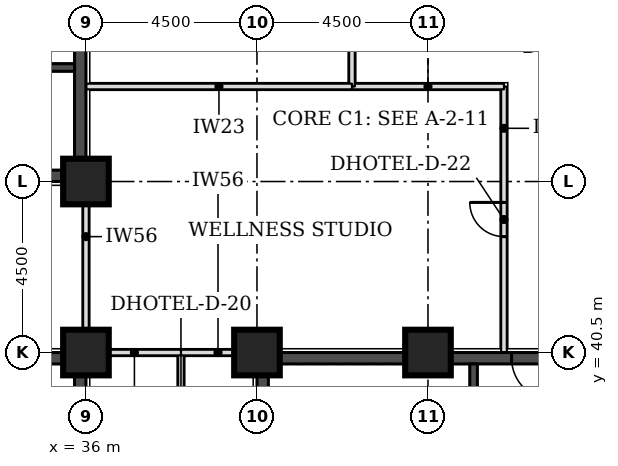
"""IFC4 building model, lengths in metres.
Left out: names, types, materials, properties, quantities, classifications, styles, units other than length and angle.
Written with IfcOpenShell. Run it as: python <this file> out.ifc"""

import sys

from ifc_helpers import new_model, si_unit, direction, frame, frame_2d, origin, origin_2d, place, context, subcontext, project, spatial, rectangle, extrude, element, fill, save


model = new_model("IFC4")
c1 = context("Model", 3, precision=1e-05, world=origin(), true_north=direction((0.0, 1.0)))
c2 = subcontext(c1, "Body", "Model", "MODEL_VIEW")
j1 = project(units=[si_unit("LENGTHUNIT", "METRE"), si_unit("PLANEANGLEUNIT", "RADIAN")], contexts=[c1])
p1 = place(None, origin())
s1 = spatial("IfcSite", under=j1, at=p1, CompositionType="ELEMENT")
p2 = place(p1, origin())
s2 = spatial("IfcBuilding", under=s1, at=p2, CompositionType="ELEMENT")
p3 = place(p2, frame((0.0, 0.0, 36.3)))
s3 = spatial("IfcBuildingStorey", under=s2, at=p3, CompositionType="ELEMENT", Elevation=36.3)
for number, where, z_axis, x_axis in (
    (1, (36.0, 40.5, 0.0), (0.0, 0.0, 1.0), (1.0, 0.0, 0.0)),
    (2, (40.5, 40.5, 0.0), (0.0, 0.0, 1.0), (1.0, 0.0, 0.0)),
    (3, (45.0, 40.5, 0.0), (0.0, 0.0, 1.0), (1.0, 0.0, 0.0)),
    (4, (36.0, 45.0, 0.0), (0.0, 0.0, 1.0), (1.0, 0.0, 0.0)),
):
    element("IfcColumn", number, at=place(p3, frame(where, z_axis=z_axis, x_axis=x_axis)), inside=s3, PredefinedType="COLUMN", context=c2, shape_type="SweptSolid", body=[
        extrude(rectangle(XDim=1.2, YDim=1.2, at=origin_2d()), origin(), (0.0, 0.0, 1.0), 3.3),
    ])
p4 = place(p3, frame((27.3, 45.15, 0.0), z_axis=(0.0, 0.0, 1.0), x_axis=(1.0, 0.0, 0.0)))
e5 = element("IfcWall", 5, at=p4, inside=s3, PredefinedType="SHEAR", context=c2, shape_type="SweptSolid", body=[
    extrude(rectangle(XDim=8.4, YDim=0.3, at=frame_2d((4.2, 0.0))), origin(), (0.0, 0.0, 1.0), 3.3),
])
p5 = place(p4, frame((5.2, 0.0, 0.0)))
e6 = element("IfcOpeningElement", 6, at=p5, cuts=e5, PredefinedType="OPENING", context=c2, shape_type="SweptSolid", body=[
    extrude(rectangle(XDim=1.0, YDim=2.1, at=frame_2d((0.5, 1.05))), frame((0.0, 0.16, 0.0), z_axis=(0.0, -1.0, 0.0), x_axis=(1.0, 0.0, 0.0)), (0.0, 0.0, 1.0), 0.32),
])
p6 = place(p3, frame((35.85, 45.0, 0.0), z_axis=(0.0, 0.0, 1.0), x_axis=(0.0, 1.0, 0.0)))
e7 = element("IfcWall", 7, at=p6, inside=s3, PredefinedType="SHEAR", context=c2, shape_type="SweptSolid", body=[
    extrude(rectangle(XDim=9.0, YDim=0.3, at=frame_2d((4.5, 0.0))), origin(), (0.0, 0.0, 1.0), 3.3),
])
p7 = place(p3, frame((40.8, 40.35, 0.0), z_axis=(0.0, 0.0, 1.0), x_axis=(1.0, 0.0, 0.0)))
e8 = element("IfcWall", 8, at=p7, inside=s3, PredefinedType="SHEAR", context=c2, shape_type="SweptSolid", body=[
    extrude(rectangle(XDim=8.4, YDim=0.3, at=frame_2d((4.2, 0.0))), origin(), (0.0, 0.0, 1.0), 3.3),
])
p8 = place(p7, frame((6.4, 0.0, 0.0)))
e9 = element("IfcOpeningElement", 9, at=p8, cuts=e8, PredefinedType="OPENING", context=c2, shape_type="SweptSolid", body=[
    extrude(rectangle(XDim=1.1, YDim=2.1, at=frame_2d((0.55, 1.05))), frame((0.0, 0.16, 0.0), z_axis=(0.0, -1.0, 0.0), x_axis=(1.0, 0.0, 0.0)), (0.0, 0.0, 1.0), 0.32),
])
p9 = place(p3, frame((40.65, 31.5, 0.0), z_axis=(0.0, 0.0, 1.0), x_axis=(0.0, 1.0, 0.0)))
e10 = element("IfcWall", 10, at=p9, inside=s3, PredefinedType="SHEAR", context=c2, shape_type="SweptSolid", body=[
    extrude(rectangle(XDim=9.0, YDim=0.3, at=frame_2d((4.5, 0.0))), origin(), (0.0, 0.0, 1.0), 3.3),
])
p10 = place(p9, frame((0.4, 0.0, 0.0)))
e11 = element("IfcOpeningElement", 11, at=p10, cuts=e10, PredefinedType="OPENING", context=c2, shape_type="SweptSolid", body=[
    extrude(rectangle(XDim=1.1, YDim=2.1, at=frame_2d((0.55, 1.05))), frame((0.0, 0.16, 0.0), z_axis=(0.0, -1.0, 0.0), x_axis=(1.0, 0.0, 0.0)), (0.0, 0.0, 1.0), 0.32),
])
p11 = place(p3, frame((27.3, 40.35, 0.0), z_axis=(0.0, 0.0, 1.0), x_axis=(1.0, 0.0, 0.0)))
e12 = element("IfcWall", 12, at=p11, inside=s3, PredefinedType="SHEAR", context=c2, shape_type="SweptSolid", body=[
    extrude(rectangle(XDim=8.4, YDim=0.3, at=frame_2d((4.2, 0.0))), origin(), (0.0, 0.0, 1.0), 3.3),
])
p12 = place(p11, frame((6.4, 0.0, 0.0)))
e13 = element("IfcOpeningElement", 13, at=p12, cuts=e12, PredefinedType="OPENING", context=c2, shape_type="SweptSolid", body=[
    extrude(rectangle(XDim=1.1, YDim=2.1, at=frame_2d((0.55, 1.05))), frame((0.0, 0.16, 0.0), z_axis=(0.0, -1.0, 0.0), x_axis=(1.0, 0.0, 0.0)), (0.0, 0.0, 1.0), 0.32),
])
p13 = place(p3, frame((35.85, 31.5, 0.0), z_axis=(0.0, 0.0, 1.0), x_axis=(0.0, 1.0, 0.0)))
e14 = element("IfcWall", 14, at=p13, inside=s3, PredefinedType="SHEAR", context=c2, shape_type="SweptSolid", body=[
    extrude(rectangle(XDim=9.0, YDim=0.3, at=frame_2d((4.5, 0.0))), origin(), (0.0, 0.0, 1.0), 3.3),
])
p14 = place(p3, frame((38.5, 27.15, 0.0), z_axis=(0.0, 0.0, 1.0), x_axis=(0.0, 1.0, 0.0)))
e15 = element("IfcWall", 15, at=p14, inside=s3, PredefinedType="PARTITIONING", context=c2, shape_type="SweptSolid", body=[
    extrude(rectangle(XDim=13.35, YDim=0.15, at=frame_2d((6.675, 0.0))), origin(), (0.0, 0.0, 1.0), 3.08),
])
p15 = place(p14, frame((6.225, 0.0, 0.0)))
e16 = element("IfcOpeningElement", 16, at=p15, cuts=e15, PredefinedType="OPENING", context=c2, shape_type="SweptSolid", body=[
    extrude(rectangle(XDim=0.9, YDim=2.1, at=frame_2d((0.45, 1.05))), frame((0.0, 0.085, 0.0), z_axis=(0.0, -1.0, 0.0), x_axis=(1.0, 0.0, 0.0)), (0.0, 0.0, 1.0), 0.17),
])
p16 = place(p3, frame((38.5, 40.5, 0.0), z_axis=(0.0, 0.0, 1.0), x_axis=(1.0, 0.0, 0.0)))
e17 = element("IfcWall", 17, at=p16, inside=s3, PredefinedType="PARTITIONING", context=c2, shape_type="SweptSolid", body=[
    extrude(rectangle(XDim=1.95, YDim=0.15, at=frame_2d((0.975, 0.0))), origin(), (0.0, 0.0, 1.0), 2.33),
])
p17 = place(p3, frame((36.0, 40.55, 0.0), z_axis=(0.0, 0.0, 1.0), x_axis=(0.0, 1.0, 0.0)))
e18 = element("IfcWall", 18, at=p17, inside=s3, PredefinedType="PARTITIONING", context=c2, shape_type="SweptSolid", body=[
    extrude(rectangle(XDim=4.4, YDim=0.15, at=frame_2d((2.2, 0.0))), origin(), (0.0, 0.0, 1.0), 2.33),
])
p18 = place(p3, frame((47.0, 40.5, 0.0), z_axis=(0.0, 0.0, 1.0), x_axis=(0.0, 1.0, 0.0)))
e19 = element("IfcWall", 19, at=p18, inside=s3, PredefinedType="PARTITIONING", context=c2, shape_type="SweptSolid", body=[
    extrude(rectangle(XDim=7.0, YDim=0.15, at=frame_2d((3.5, 0.0))), origin(), (0.0, 0.0, 1.0), 3.08),
])
p19 = place(p18, frame((3.05, 0.0, 0.0)))
e20 = element("IfcOpeningElement", 20, at=p19, cuts=e19, PredefinedType="OPENING", context=c2, shape_type="SweptSolid", body=[
    extrude(rectangle(XDim=0.9, YDim=2.1, at=frame_2d((0.45, 1.05))), frame((0.0, 0.085, 0.0), z_axis=(0.0, -1.0, 0.0), x_axis=(1.0, 0.0, 0.0)), (0.0, 0.0, 1.0), 0.17),
])
p20 = place(p3, frame((43.0, 47.5, 0.0), z_axis=(0.0, 0.0, 1.0), x_axis=(1.0, 0.0, 0.0)))
e21 = element("IfcWall", 21, at=p20, inside=s3, PredefinedType="PARTITIONING", context=c2, shape_type="SweptSolid", body=[
    extrude(rectangle(XDim=4.0, YDim=0.15, at=frame_2d((2.0, 0.0))), origin(), (0.0, 0.0, 1.0), 3.08),
])
p21 = place(p3, frame((43.0, 47.5, 0.0), z_axis=(0.0, 0.0, 1.0), x_axis=(0.0, 1.0, 0.0)))
e22 = element("IfcWall", 22, at=p21, inside=s3, PredefinedType="PARTITIONING", context=c2, shape_type="SweptSolid", body=[
    extrude(rectangle(XDim=7.85, YDim=0.15, at=frame_2d((3.925, 0.0))), origin(), (0.0, 0.0, 1.0), 3.08),
])
p22 = place(p21, frame((3.475, 0.0, 0.0)))
e23 = element("IfcOpeningElement", 23, at=p22, cuts=e22, PredefinedType="OPENING", context=c2, shape_type="SweptSolid", body=[
    extrude(rectangle(XDim=0.9, YDim=2.1, at=frame_2d((0.45, 1.05))), frame((0.0, 0.085, 0.0), z_axis=(0.0, -1.0, 0.0), x_axis=(1.0, 0.0, 0.0)), (0.0, 0.0, 1.0), 0.17),
])
p23 = place(p3, frame((36.05, 40.5, 0.0), z_axis=(0.0, 0.0, 1.0), x_axis=(1.0, 0.0, 0.0)))
e24 = element("IfcWall", 24, at=p23, inside=s3, PredefinedType="PARTITIONING", context=c2, shape_type="SweptSolid", body=[
    extrude(rectangle(XDim=2.45, YDim=0.15, at=frame_2d((1.225, 0.0))), origin(), (0.0, 0.0, 1.0), 2.33),
])
p24 = place(p3, frame((36.0, 47.5, 0.0), z_axis=(0.0, 0.0, 1.0), x_axis=(1.0, 0.0, 0.0)))
e25 = element("IfcWall", 25, at=p24, inside=s3, PredefinedType="PARTITIONING", context=c2, shape_type="SweptSolid", body=[
    extrude(rectangle(XDim=7.0, YDim=0.15, at=frame_2d((3.5, 0.0))), origin(), (0.0, 0.0, 1.0), 3.08),
])
p25 = place(p3, frame((32.7, 48.0, 0.0), z_axis=(0.0, 0.0, 1.0), x_axis=(1.0, 0.0, 0.0)))
e26 = element("IfcWall", 26, at=p25, inside=s3, PredefinedType="SOLIDWALL", context=c2, shape_type="SweptSolid", body=[
    extrude(rectangle(XDim=3.0, YDim=0.2, at=frame_2d((1.5, 0.0))), origin(), (0.0, 0.0, 1.0), 3.08),
])
p26 = place(p3, frame((46.2, 34.5, 0.0), z_axis=(0.0, 0.0, 1.0), x_axis=(0.0, 1.0, 0.0)))
e27 = element("IfcWall", 27, at=p26, inside=s3, PredefinedType="SOLIDWALL", context=c2, shape_type="SweptSolid", body=[
    extrude(rectangle(XDim=5.7, YDim=0.2, at=frame_2d((2.85, 0.0))), origin(), (0.0, 0.0, 1.0), 3.08),
])
p27 = place(p19, origin())
e28 = element("IfcDoor", 28, at=p27, inside=s3, OperationType="SINGLE_SWING_RIGHT", PredefinedType="DOOR", context=c2, shape_type="SweptSolid", body=[
    extrude(rectangle(XDim=0.9, YDim=2.1, at=frame_2d((0.45, 1.05))), frame((0.0, 0.025, 0.0), z_axis=(0.0, -1.0, 0.0), x_axis=(1.0, 0.0, 0.0)), (0.0, 0.0, 1.0), 0.05),
])
fill(e20, e28)
p28 = place(p8, frame((1.1, 0.0, 0.0), z_axis=(0.0, 0.0, 1.0), x_axis=(-1.0, 0.0, 0.0)))
e29 = element("IfcDoor", 29, at=p28, inside=s3, OperationType="SINGLE_SWING_LEFT", PredefinedType="DOOR", context=c2, shape_type="SweptSolid", body=[
    extrude(rectangle(XDim=1.1, YDim=2.1, at=frame_2d((0.55, 1.05))), frame((0.0, 0.025, 0.0), z_axis=(0.0, -1.0, 0.0), x_axis=(1.0, 0.0, 0.0)), (0.0, 0.0, 1.0), 0.05),
])
fill(e9, e29)
save(model, sys.argv[1])
